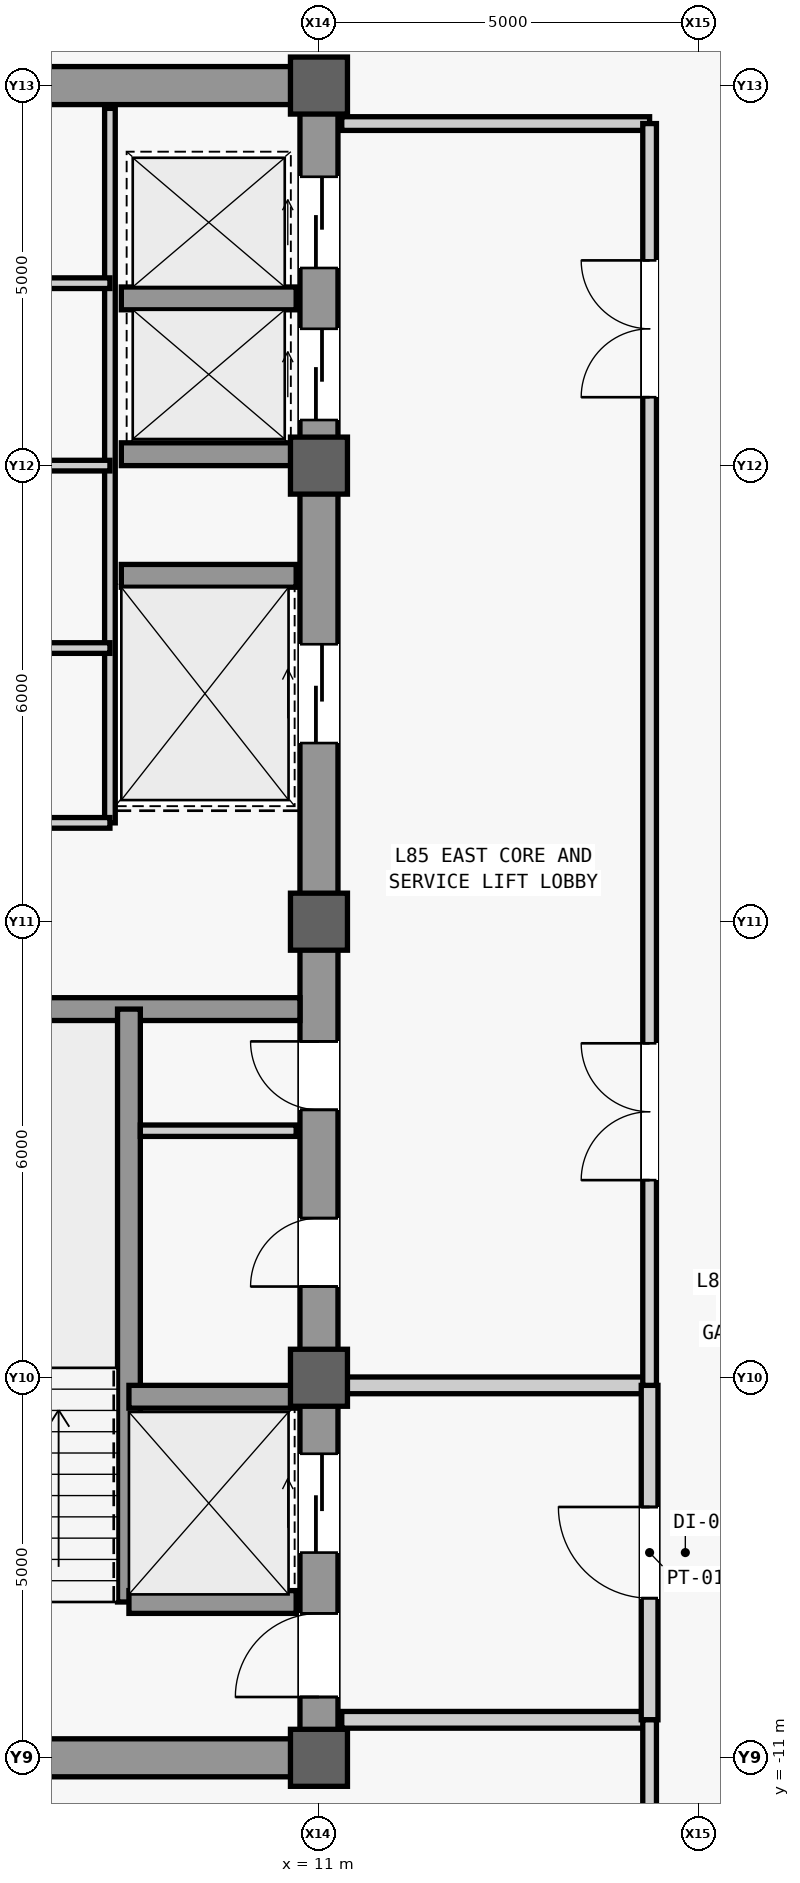
"""IFC4 building model, lengths in metres.
Left out: names, types, materials, properties, quantities, classifications, styles, units other than length and angle.
Written with IfcOpenShell. Run it as: python <this file> out.ifc"""

import sys

from ifc_helpers import new_model, si_unit, direction, frame, frame_2d, origin, origin_2d, place, context, subcontext, project, spatial, rectangle, extrude, source, transform, mapped, element, fill, save


model = new_model("IFC4")
c1 = context("Model", 3, precision=1e-05, world=origin(), true_north=direction((0.0, 1.0)))
c2 = subcontext(c1, "Body", "Model", "MODEL_VIEW")
j1 = project(units=[si_unit("LENGTHUNIT", "METRE"), si_unit("PLANEANGLEUNIT", "RADIAN")], contexts=[c1])
p1 = place(None, origin())
s1 = spatial("IfcSite", under=j1, at=p1, CompositionType="ELEMENT")
p2 = place(p1, origin())
s2 = spatial("IfcBuilding", under=s1, at=p2, CompositionType="ELEMENT")
p3 = place(p2, frame((0.0, 0.0, 358.3)))
s3 = spatial("IfcBuildingStorey", under=s2, at=p3, CompositionType="ELEMENT", Elevation=358.3)
m1 = source(origin(), c2, "Body", "SweptSolid", [
    extrude(rectangle(XDim=22.0, YDim=0.5, at=frame_2d((11.0, 0.0))), origin(), (0.0, 0.0, 1.0), 3.74),
])
p4 = place(p3, frame((11.0, -11.0, 0.0), z_axis=(0.0, 0.0, 1.0), x_axis=(0.0, 1.0, 0.0)))
e1 = element("IfcWall", 1, at=p4, inside=s3, PredefinedType="SHEAR", context=c2, shape_type="MappedRepresentation", body=[
    mapped(m1, transform((0.0, 0.0, 0.0), scale=1.0)),
])
m2 = source(origin(), c2, "Body", "SweptSolid", [
    extrude(rectangle(XDim=1.1, YDim=2.2, at=frame_2d((0.55, 1.1))), frame((0.0, 0.26, 0.0), z_axis=(0.0, -1.0, 0.0), x_axis=(1.0, 0.0, 0.0)), (0.0, 0.0, 1.0), 0.52),
])
p5 = place(p4, frame((0.8, 0.0, 0.0)))
e2 = element("IfcOpeningElement", 2, at=p5, cuts=e1, PredefinedType="OPENING", context=c2, shape_type="MappedRepresentation", body=[
    mapped(m2, transform((0.0, 0.0, 0.0), scale=1.0)),
])
m3 = source(origin(), c2, "Body", "SweptSolid", [
    extrude(rectangle(XDim=0.9, YDim=2.15, at=frame_2d((0.45, 1.075))), frame((0.0, 0.26, 0.0), z_axis=(0.0, -1.0, 0.0), x_axis=(1.0, 0.0, 0.0)), (0.0, 0.0, 1.0), 0.52),
])
p6 = place(p4, frame((6.2, 0.0, 0.0)))
e3 = element("IfcOpeningElement", 3, at=p6, cuts=e1, PredefinedType="OPENING", context=c2, shape_type="MappedRepresentation", body=[
    mapped(m3, transform((0.0, 0.0, 0.0), scale=1.0)),
])
p7 = place(p4, frame((8.525, 0.0, 0.0)))
e4 = element("IfcOpeningElement", 4, at=p7, cuts=e1, PredefinedType="OPENING", context=c2, shape_type="MappedRepresentation", body=[
    mapped(m3, transform((0.0, 0.0, 0.0), scale=1.0)),
])
m4 = source(origin(), c2, "Body", "SweptSolid", [
    extrude(rectangle(XDim=1.2, YDim=2.3, at=frame_2d((0.6, 1.15))), frame((0.0, 0.26, 0.0), z_axis=(0.0, -1.0, 0.0), x_axis=(1.0, 0.0, 0.0)), (0.0, 0.0, 1.0), 0.52),
])
p8 = place(p4, frame((17.6, 0.0, 0.0)))
e5 = element("IfcOpeningElement", 5, at=p8, cuts=e1, PredefinedType="OPENING", context=c2, shape_type="MappedRepresentation", body=[
    mapped(m4, transform((0.0, 0.0, 0.0), scale=1.0)),
])
p9 = place(p4, frame((19.6, 0.0, 0.0)))
e6 = element("IfcOpeningElement", 6, at=p9, cuts=e1, PredefinedType="OPENING", context=c2, shape_type="MappedRepresentation", body=[
    mapped(m4, transform((0.0, 0.0, 0.0), scale=1.0)),
])
m5 = source(origin(), c2, "Body", "SweptSolid", [
    extrude(rectangle(XDim=1.3, YDim=2.3, at=frame_2d((0.65, 1.15))), frame((0.0, 0.26, 0.0), z_axis=(0.0, -1.0, 0.0), x_axis=(1.0, 0.0, 0.0)), (0.0, 0.0, 1.0), 0.52),
])
p10 = place(p4, frame((2.7, 0.0, 0.0)))
e7 = element("IfcOpeningElement", 7, at=p10, cuts=e1, PredefinedType="OPENING", context=c2, shape_type="MappedRepresentation", body=[
    mapped(m5, transform((0.0, 0.0, 0.0), scale=1.0)),
])
p11 = place(p4, frame((13.35, 0.0, 0.0)))
e8 = element("IfcOpeningElement", 8, at=p11, cuts=e1, PredefinedType="OPENING", context=c2, shape_type="MappedRepresentation", body=[
    mapped(m5, transform((0.0, 0.0, 0.0), scale=1.0)),
])
m6 = source(origin(), c2, "Body", "SweptSolid", [
    extrude(rectangle(XDim=5.9, YDim=0.5, at=frame_2d((2.95, 0.0))), origin(), (0.0, 0.0, 1.0), 3.74),
])
p12 = place(p3, frame((4.85, -11.0, 0.0), z_axis=(0.0, 0.0, 1.0), x_axis=(1.0, 0.0, 0.0)))
e9 = element("IfcWall", 9, at=p12, inside=s3, PredefinedType="SHEAR", context=c2, shape_type="MappedRepresentation", body=[
    mapped(m6, transform((0.0, 0.0, 0.0), scale=1.0)),
])
p13 = place(p3, frame((4.85, 11.0, 0.0), z_axis=(0.0, 0.0, 1.0), x_axis=(1.0, 0.0, 0.0)))
e10 = element("IfcWall", 10, at=p13, inside=s3, PredefinedType="SHEAR", context=c2, shape_type="MappedRepresentation", body=[
    mapped(m6, transform((0.0, 0.0, 0.0), scale=1.0)),
])
m7 = source(origin(), c2, "Body", "SweptSolid", [
    extrude(rectangle(XDim=1.05, YDim=2.2, at=frame_2d((0.525, 1.1))), frame((0.0, 0.26, 0.0), z_axis=(0.0, -1.0, 0.0), x_axis=(1.0, 0.0, 0.0)), (0.0, 0.0, 1.0), 0.52),
])
p14 = place(p13, frame((1.375, 0.0, 0.0)))
e11 = element("IfcOpeningElement", 11, at=p14, cuts=e10, PredefinedType="OPENING", context=c2, shape_type="MappedRepresentation", body=[
    mapped(m7, transform((0.0, 0.0, 0.0), scale=1.0)),
])
m8 = source(origin(), c2, "Body", "SweptSolid", [
    extrude(rectangle(XDim=5.65, YDim=0.3, at=frame_2d((2.825, 0.0))), origin(), (0.0, 0.0, 1.0), 3.74),
])
p15 = place(p3, frame((5.1, -1.15, 0.0), z_axis=(0.0, 0.0, 1.0), x_axis=(1.0, 0.0, 0.0)))
e12 = element("IfcWall", 12, at=p15, inside=s3, PredefinedType="SHEAR", context=c2, shape_type="MappedRepresentation", body=[
    mapped(m8, transform((0.0, 0.0, 0.0), scale=1.0)),
])
m9 = source(origin(), c2, "Body", "SweptSolid", [
    extrude(rectangle(XDim=0.75, YDim=0.75, at=origin_2d()), origin(), (0.0, 0.0, 1.0), 4.0),
])
for number, where, z_axis, x_axis in (
    (13, (11.0, -11.0, 0.0), (0.0, 0.0, 1.0), (1.0, 0.0, 0.0)),
    (14, (11.0, -6.0, 0.0), (0.0, 0.0, 1.0), (1.0, 0.0, 0.0)),
    (15, (11.0, 0.0, 0.0), (0.0, 0.0, 1.0), (1.0, 0.0, 0.0)),
    (16, (11.0, 6.0, 0.0), (0.0, 0.0, 1.0), (1.0, 0.0, 0.0)),
    (17, (11.0, 11.0, 0.0), (0.0, 0.0, 1.0), (1.0, 0.0, 0.0)),
):
    element("IfcColumn", number, at=place(p3, frame(where, z_axis=z_axis, x_axis=x_axis)), inside=s3, PredefinedType="COLUMN", context=c2, shape_type="MappedRepresentation", body=[
        mapped(m9, transform((0.0, 0.0, 0.0), scale=1.0)),
    ])
m10 = source(origin(), c2, "Body", "SweptSolid", [
    extrude(rectangle(XDim=7.8, YDim=0.3, at=frame_2d((3.9, 0.0))), origin(), (0.0, 0.0, 1.0), 3.74),
])
p16 = place(p3, frame((8.5, -8.95, 0.0), z_axis=(0.0, 0.0, 1.0), x_axis=(0.0, 1.0, 0.0)))
e18 = element("IfcWall", 18, at=p16, inside=s3, PredefinedType="SHEAR", context=c2, shape_type="MappedRepresentation", body=[
    mapped(m10, transform((0.0, 0.0, 0.0), scale=1.0)),
])
m11 = source(origin(), c2, "Body", "SweptSolid", [
    extrude(rectangle(XDim=2.2, YDim=0.3, at=frame_2d((1.1, 0.0))), origin(), (0.0, 0.0, 1.0), 3.74),
])
for number, where, z_axis, x_axis in (
    (19, (8.5, -8.95, 0.0), (0.0, 0.0, 1.0), (1.0, 0.0, 0.0)),
    (20, (8.5, -6.25, 0.0), (0.0, 0.0, 1.0), (1.0, 0.0, 0.0)),
):
    element("IfcWall", number, at=place(p3, frame(where, z_axis=z_axis, x_axis=x_axis)), inside=s3, PredefinedType="SHEAR", context=c2, shape_type="MappedRepresentation", body=[
        mapped(m11, transform((0.0, 0.0, 0.0), scale=1.0)),
    ])
m12 = source(origin(), c2, "Body", "SweptSolid", [
    extrude(rectangle(XDim=2.3, YDim=0.3, at=frame_2d((1.15, 0.0))), origin(), (0.0, 0.0, 1.0), 3.74),
])
for number, where, z_axis, x_axis in (
    (21, (8.4, 4.55, 0.0), (0.0, 0.0, 1.0), (1.0, 0.0, 0.0)),
    (22, (8.4, 6.15, 0.0), (0.0, 0.0, 1.0), (1.0, 0.0, 0.0)),
    (23, (8.4, 8.2, 0.0), (0.0, 0.0, 1.0), (1.0, 0.0, 0.0)),
):
    element("IfcWall", number, at=place(p3, frame(where, z_axis=z_axis, x_axis=x_axis)), inside=s3, PredefinedType="SHEAR", context=c2, shape_type="MappedRepresentation", body=[
        mapped(m12, transform((0.0, 0.0, 0.0), scale=1.0)),
    ])
m13 = source(origin(), c2, "Body", "SweptSolid", [
    extrude(rectangle(XDim=2.05, YDim=0.15, at=frame_2d((1.025, 0.0))), origin(), (0.0, 0.0, 1.0), 3.74),
])
p17 = place(p3, frame((8.65, -2.75, 0.0), z_axis=(0.0, 0.0, 1.0), x_axis=(1.0, 0.0, 0.0)))
e24 = element("IfcWall", 24, at=p17, inside=s3, PredefinedType="PARTITIONING", context=c2, shape_type="MappedRepresentation", body=[
    mapped(m13, transform((0.0, 0.0, 0.0), scale=1.0)),
])
m14 = source(origin(), c2, "Body", "SweptSolid", [
    extrude(rectangle(XDim=9.4, YDim=0.14, at=frame_2d((4.7, 0.0))), origin(), (0.0, 0.0, 1.0), 3.74),
])
p18 = place(p3, frame((8.25, 1.3, 0.0), z_axis=(0.0, 0.0, 1.0), x_axis=(0.0, 1.0, 0.0)))
e25 = element("IfcWall", 25, at=p18, inside=s3, PredefinedType="PARTITIONING", context=c2, shape_type="MappedRepresentation", body=[
    mapped(m14, transform((0.0, 0.0, 0.0), scale=1.0)),
])
m15 = source(origin(), c2, "Body", "SweptSolid", [
    extrude(rectangle(XDim=3.15, YDim=0.14, at=frame_2d((1.575, 0.0))), origin(), (0.0, 0.0, 1.0), 3.74),
])
p19 = place(p3, frame((5.1, 1.3, 0.0), z_axis=(0.0, 0.0, 1.0), x_axis=(1.0, 0.0, 0.0)))
e26 = element("IfcWall", 26, at=p19, inside=s3, PredefinedType="PARTITIONING", context=c2, shape_type="MappedRepresentation", body=[
    mapped(m15, transform((0.0, 0.0, 0.0), scale=1.0)),
])
p20 = place(p3, frame((5.1, 8.4, 0.0), z_axis=(0.0, 0.0, 1.0), x_axis=(1.0, 0.0, 0.0)))
e27 = element("IfcWall", 27, at=p20, inside=s3, PredefinedType="PARTITIONING", context=c2, shape_type="MappedRepresentation", body=[
    mapped(m15, transform((0.0, 0.0, 0.0), scale=1.0)),
])
m16 = source(origin(), c2, "Body", "SweptSolid", [
    extrude(rectangle(XDim=0.9, YDim=2.15, at=frame_2d((0.45, 1.075))), frame((0.0, 0.08, 0.0), z_axis=(0.0, -1.0, 0.0), x_axis=(1.0, 0.0, 0.0)), (0.0, 0.0, 1.0), 0.16),
])
p21 = place(p20, frame((1.13, 0.0, 0.0)))
e28 = element("IfcOpeningElement", 28, at=p21, cuts=e27, PredefinedType="OPENING", context=c2, shape_type="MappedRepresentation", body=[
    mapped(m16, transform((0.0, 0.0, 0.0), scale=1.0)),
])
p22 = place(p3, frame((5.1, 6.0, 0.0), z_axis=(0.0, 0.0, 1.0), x_axis=(1.0, 0.0, 0.0)))
e29 = element("IfcWall", 29, at=p22, inside=s3, PredefinedType="PARTITIONING", context=c2, shape_type="MappedRepresentation", body=[
    mapped(m15, transform((0.0, 0.0, 0.0), scale=1.0)),
])
p23 = place(p22, frame((1.13, 0.0, 0.0)))
e30 = element("IfcOpeningElement", 30, at=p23, cuts=e29, PredefinedType="OPENING", context=c2, shape_type="MappedRepresentation", body=[
    mapped(m16, transform((0.0, 0.0, 0.0), scale=1.0)),
])
p24 = place(p3, frame((5.1, 3.6, 0.0), z_axis=(0.0, 0.0, 1.0), x_axis=(1.0, 0.0, 0.0)))
e31 = element("IfcWall", 31, at=p24, inside=s3, PredefinedType="PARTITIONING", context=c2, shape_type="MappedRepresentation", body=[
    mapped(m15, transform((0.0, 0.0, 0.0), scale=1.0)),
])
p25 = place(p24, frame((1.13, 0.0, 0.0)))
e32 = element("IfcOpeningElement", 32, at=p25, cuts=e31, PredefinedType="OPENING", context=c2, shape_type="MappedRepresentation", body=[
    mapped(m16, transform((0.0, 0.0, 0.0), scale=1.0)),
])
m17 = source(origin(), c2, "Body", "SweptSolid", [
    extrude(rectangle(XDim=4.05, YDim=0.22, at=frame_2d((2.025, 0.0))), origin(), (0.0, 0.0, 1.0), 3.74),
])
p26 = place(p3, frame((11.3, -10.5, 0.0), z_axis=(0.0, 0.0, 1.0), x_axis=(1.0, 0.0, 0.0)))
e33 = element("IfcWall", 33, at=p26, inside=s3, PredefinedType="PARTITIONING", context=c2, shape_type="MappedRepresentation", body=[
    mapped(m17, transform((0.0, 0.0, 0.0), scale=1.0)),
])
m18 = source(origin(), c2, "Body", "SweptSolid", [
    extrude(rectangle(XDim=4.05, YDim=0.22, at=frame_2d((2.025, 0.0))), origin(), (0.0, 0.0, 1.0), 3.124),
])
p27 = place(p3, frame((11.3, -6.1, 0.0), z_axis=(0.0, 0.0, 1.0), x_axis=(1.0, 0.0, 0.0)))
e34 = element("IfcWall", 34, at=p27, inside=s3, PredefinedType="PARTITIONING", context=c2, shape_type="MappedRepresentation", body=[
    mapped(m18, transform((0.0, 0.0, 0.0), scale=1.0)),
])
m19 = source(origin(), c2, "Body", "SweptSolid", [
    extrude(rectangle(XDim=4.4, YDim=0.22, at=frame_2d((2.2, 0.0))), origin(), (0.0, 0.0, 1.0), 3.74),
])
p28 = place(p3, frame((15.35, -10.5, 0.0), z_axis=(0.0, 0.0, 1.0), x_axis=(0.0, 1.0, 0.0)))
e35 = element("IfcWall", 35, at=p28, inside=s3, PredefinedType="PARTITIONING", context=c2, shape_type="MappedRepresentation", body=[
    mapped(m19, transform((0.0, 0.0, 0.0), scale=1.0)),
])
m20 = source(origin(), c2, "Body", "SweptSolid", [
    extrude(rectangle(XDim=1.2, YDim=2.2, at=frame_2d((0.6, 1.1))), frame((0.0, 0.12, 0.0), z_axis=(0.0, -1.0, 0.0), x_axis=(1.0, 0.0, 0.0)), (0.0, 0.0, 1.0), 0.24),
])
p29 = place(p28, frame((1.6, 0.0, 0.0)))
e36 = element("IfcOpeningElement", 36, at=p29, cuts=e35, PredefinedType="OPENING", context=c2, shape_type="MappedRepresentation", body=[
    mapped(m20, transform((0.0, 0.0, 0.0), scale=1.0)),
])
m21 = source(origin(), c2, "Body", "SweptSolid", [
    extrude(rectangle(XDim=4.05, YDim=0.18, at=frame_2d((2.025, 0.0))), origin(), (0.0, 0.0, 1.0), 3.74),
])
p30 = place(p3, frame((11.3, 10.5, 0.0), z_axis=(0.0, 0.0, 1.0), x_axis=(1.0, 0.0, 0.0)))
e37 = element("IfcWall", 37, at=p30, inside=s3, PredefinedType="PARTITIONING", context=c2, shape_type="MappedRepresentation", body=[
    mapped(m21, transform((0.0, 0.0, 0.0), scale=1.0)),
])
m22 = source(origin(), c2, "Body", "SweptSolid", [
    extrude(rectangle(XDim=16.6, YDim=0.18, at=frame_2d((8.3, 0.0))), origin(), (0.0, 0.0, 1.0), 3.74),
])
p31 = place(p3, frame((15.35, -6.1, 0.0), z_axis=(0.0, 0.0, 1.0), x_axis=(0.0, 1.0, 0.0)))
e38 = element("IfcWall", 38, at=p31, inside=s3, PredefinedType="PARTITIONING", context=c2, shape_type="MappedRepresentation", body=[
    mapped(m22, transform((0.0, 0.0, 0.0), scale=1.0)),
])
m23 = source(origin(), c2, "Body", "SweptSolid", [
    extrude(rectangle(XDim=1.8, YDim=2.25, at=frame_2d((0.9, 1.125))), frame((0.0, 0.1, 0.0), z_axis=(0.0, -1.0, 0.0), x_axis=(1.0, 0.0, 0.0)), (0.0, 0.0, 1.0), 0.2),
])
p32 = place(p31, frame((2.7, 0.0, 0.0)))
e39 = element("IfcOpeningElement", 39, at=p32, cuts=e38, PredefinedType="OPENING", context=c2, shape_type="MappedRepresentation", body=[
    mapped(m23, transform((0.0, 0.0, 0.0), scale=1.0)),
])
p33 = place(p31, frame((13.0, 0.0, 0.0)))
e40 = element("IfcOpeningElement", 40, at=p33, cuts=e38, PredefinedType="OPENING", context=c2, shape_type="MappedRepresentation", body=[
    mapped(m23, transform((0.0, 0.0, 0.0), scale=1.0)),
])
m24 = source(origin(), c2, "Body", "SweptSolid", [
    extrude(rectangle(XDim=5.8, YDim=0.18, at=frame_2d((2.9, 0.0))), origin(), (0.0, 0.0, 1.0), 3.74),
])
p34 = place(p3, frame((15.35, -16.3, 0.0), z_axis=(0.0, 0.0, 1.0), x_axis=(0.0, 1.0, 0.0)))
e41 = element("IfcWall", 41, at=p34, inside=s3, PredefinedType="PARTITIONING", context=c2, shape_type="MappedRepresentation", body=[
    mapped(m24, transform((0.0, 0.0, 0.0), scale=1.0)),
])
m25 = source(origin(), c2, "Body", "SweptSolid", [
    extrude(rectangle(XDim=1.1, YDim=2.2, at=frame_2d((0.55, 1.1))), frame((0.0, 0.025, 0.0), z_axis=(0.0, -1.0, 0.0), x_axis=(1.0, 0.0, 0.0)), (0.0, 0.0, 1.0), 0.05),
])
p35 = place(p5, origin())
e42 = element("IfcDoor", 42, at=p35, inside=s3, OperationType="SINGLE_SWING_LEFT", PredefinedType="DOOR", context=c2, shape_type="MappedRepresentation", body=[
    mapped(m25, transform((0.0, 0.0, 0.0), scale=1.0)),
])
fill(e2, e42)
m26 = source(origin(), c2, "Body", "SweptSolid", [
    extrude(rectangle(XDim=0.9, YDim=2.15, at=frame_2d((0.45, 1.075))), frame((0.0, 0.025, 0.0), z_axis=(0.0, -1.0, 0.0), x_axis=(1.0, 0.0, 0.0)), (0.0, 0.0, 1.0), 0.05),
])
p36 = place(p6, origin())
e43 = element("IfcDoor", 43, at=p36, inside=s3, OperationType="SINGLE_SWING_LEFT", PredefinedType="DOOR", context=c2, shape_type="MappedRepresentation", body=[
    mapped(m26, transform((0.0, 0.0, 0.0), scale=1.0)),
])
fill(e3, e43)
p37 = place(p7, origin())
e44 = element("IfcDoor", 44, at=p37, inside=s3, OperationType="SINGLE_SWING_RIGHT", PredefinedType="DOOR", context=c2, shape_type="MappedRepresentation", body=[
    mapped(m26, transform((0.0, 0.0, 0.0), scale=1.0)),
])
fill(e4, e44)
m27 = source(origin(), c2, "Body", "SweptSolid", [
    extrude(rectangle(XDim=1.2, YDim=2.2, at=frame_2d((0.6, 1.1))), frame((0.0, 0.025, 0.0), z_axis=(0.0, -1.0, 0.0), x_axis=(1.0, 0.0, 0.0)), (0.0, 0.0, 1.0), 0.05),
])
p38 = place(p29, origin())
e45 = element("IfcDoor", 45, at=p38, inside=s3, OperationType="SINGLE_SWING_RIGHT", PredefinedType="DOOR", context=c2, shape_type="MappedRepresentation", body=[
    mapped(m27, transform((0.0, 0.0, 0.0), scale=1.0)),
])
fill(e36, e45)
m28 = source(origin(), c2, "Body", "SweptSolid", [
    extrude(rectangle(XDim=1.8, YDim=2.25, at=frame_2d((0.9, 1.125))), frame((0.0, 0.025, 0.0), z_axis=(0.0, -1.0, 0.0), x_axis=(1.0, 0.0, 0.0)), (0.0, 0.0, 1.0), 0.05),
])
p39 = place(p32, origin())
e46 = element("IfcDoor", 46, at=p39, inside=s3, OperationType="SINGLE_SWING_RIGHT", PredefinedType="DOOR", context=c2, shape_type="MappedRepresentation", body=[
    mapped(m28, transform((0.0, 0.0, 0.0), scale=1.0)),
])
fill(e39, e46)
p40 = place(p33, origin())
e47 = element("IfcDoor", 47, at=p40, inside=s3, OperationType="SINGLE_SWING_LEFT", PredefinedType="DOOR", context=c2, shape_type="MappedRepresentation", body=[
    mapped(m28, transform((0.0, 0.0, 0.0), scale=1.0)),
])
fill(e40, e47)
m29 = source(origin(), c2, "Body", "SweptSolid", [
    extrude(rectangle(XDim=1.2, YDim=2.3, at=frame_2d((0.6, 1.15))), frame((0.0, 0.025, 0.0), z_axis=(0.0, -1.0, 0.0), x_axis=(1.0, 0.0, 0.0)), (0.0, 0.0, 1.0), 0.05),
])
p41 = place(p8, origin())
e48 = element("IfcDoor", 48, at=p41, inside=s3, OperationType="SLIDING_TO_LEFT", PredefinedType="DOOR", context=c2, shape_type="MappedRepresentation", body=[
    mapped(m29, transform((0.0, 0.0, 0.0), scale=1.0)),
])
fill(e5, e48)
p42 = place(p9, origin())
e49 = element("IfcDoor", 49, at=p42, inside=s3, OperationType="SLIDING_TO_LEFT", PredefinedType="DOOR", context=c2, shape_type="MappedRepresentation", body=[
    mapped(m29, transform((0.0, 0.0, 0.0), scale=1.0)),
])
fill(e6, e49)
m30 = source(origin(), c2, "Body", "SweptSolid", [
    extrude(rectangle(XDim=1.3, YDim=2.3, at=frame_2d((0.65, 1.15))), frame((0.0, 0.025, 0.0), z_axis=(0.0, -1.0, 0.0), x_axis=(1.0, 0.0, 0.0)), (0.0, 0.0, 1.0), 0.05),
])
p43 = place(p10, origin())
e50 = element("IfcDoor", 50, at=p43, inside=s3, OperationType="SLIDING_TO_LEFT", PredefinedType="DOOR", context=c2, shape_type="MappedRepresentation", body=[
    mapped(m30, transform((0.0, 0.0, 0.0), scale=1.0)),
])
fill(e7, e50)
p44 = place(p11, origin())
e51 = element("IfcDoor", 51, at=p44, inside=s3, OperationType="SLIDING_TO_LEFT", PredefinedType="DOOR", context=c2, shape_type="MappedRepresentation", body=[
    mapped(m30, transform((0.0, 0.0, 0.0), scale=1.0)),
])
fill(e8, e51)
save(model, sys.argv[1])
